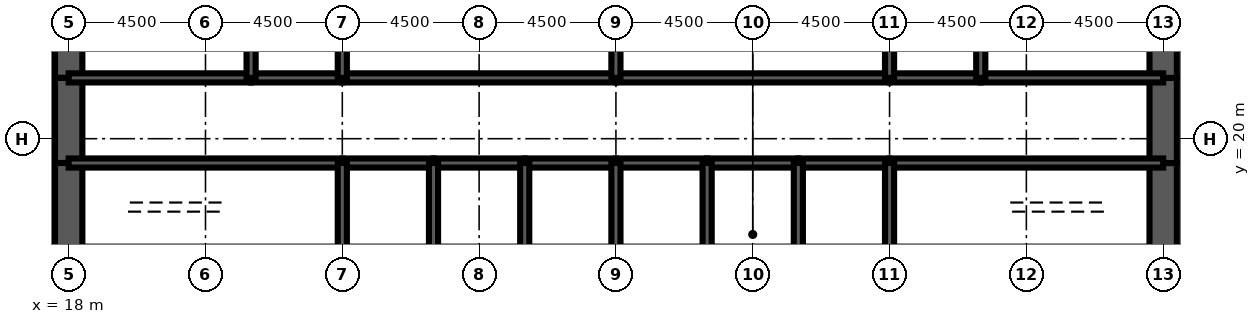
"""IFC4 building model, lengths in metres.
Left out: names, types, materials, properties, quantities, classifications, styles, units other than length and angle.
Written with IfcOpenShell. Run it as: python <this file> out.ifc"""

import sys

from ifc_helpers import new_model, si_unit, direction, frame, frame_2d, origin, place, context, subcontext, project, spatial, rectangle, extrude, element, fill, save


model = new_model("IFC4")
c1 = context("Model", 3, precision=1e-05, world=origin(), true_north=direction((0.0, 1.0)))
c2 = subcontext(c1, "Body", "Model", "MODEL_VIEW")
j1 = project(units=[si_unit("LENGTHUNIT", "METRE"), si_unit("PLANEANGLEUNIT", "RADIAN")], contexts=[c1])
p1 = place(None, origin())
s1 = spatial("IfcSite", under=j1, at=p1, CompositionType="ELEMENT")
p2 = place(p1, origin())
s2 = spatial("IfcBuilding", under=s1, at=p2, CompositionType="ELEMENT")
p3 = place(p2, frame((0.0, 0.0, 104.7)))
s3 = spatial("IfcBuildingStorey", under=s2, at=p3, CompositionType="ELEMENT", Elevation=104.7)
p4 = place(p3, frame((18.0, 26.0, 0.0), z_axis=(0.0, 0.0, 1.0), x_axis=(0.0, -1.0, 0.0)))
e1 = element("IfcWall", 1, at=p4, inside=s3, PredefinedType="SHEAR", context=c2, shape_type="SweptSolid", body=[
    extrude(rectangle(XDim=4.0, YDim=0.9, at=frame_2d((2.0, 0.0))), origin(), (0.0, 0.0, 1.0), 4.2),
])
p5 = place(p3, frame((18.0, 22.0, 0.0), z_axis=(0.0, 0.0, 1.0), x_axis=(0.0, -1.0, 0.0)))
e2 = element("IfcWall", 2, at=p5, inside=s3, PredefinedType="SHEAR", context=c2, shape_type="SweptSolid", body=[
    extrude(rectangle(XDim=2.8, YDim=0.9, at=frame_2d((1.4, 0.0))), origin(), (0.0, 0.0, 1.0), 4.2),
])
p6 = place(p5, frame((0.6, 0.0, 0.0)))
e3 = element("IfcOpeningElement", 3, at=p6, cuts=e2, PredefinedType="OPENING", context=c2, shape_type="SweptSolid", body=[
    extrude(rectangle(XDim=1.8, YDim=2.1, at=frame_2d((0.9, 1.05))), frame((0.0, 0.46, 0.0), z_axis=(0.0, -1.0, 0.0), x_axis=(1.0, 0.0, 0.0)), (0.0, 0.0, 1.0), 0.92),
])
for number, where, z_axis, x_axis in (
    (4, (18.0, 19.2, 0.0), (0.0, 0.0, 1.0), (0.0, -1.0, 0.0)),
    (5, (54.0, 16.0, 0.0), (0.0, 0.0, 1.0), (0.0, 1.0, 0.0)),
):
    element("IfcWall", number, at=place(p3, frame(where, z_axis=z_axis, x_axis=x_axis)), inside=s3, PredefinedType="SHEAR", context=c2, shape_type="SweptSolid", body=[
        extrude(rectangle(XDim=3.2, YDim=0.9, at=frame_2d((1.6, 0.0))), origin(), (0.0, 0.0, 1.0), 4.2),
    ])
p7 = place(p3, frame((54.0, 19.2, 0.0), z_axis=(0.0, 0.0, 1.0), x_axis=(0.0, 1.0, 0.0)))
e6 = element("IfcWall", 6, at=p7, inside=s3, PredefinedType="SHEAR", context=c2, shape_type="SweptSolid", body=[
    extrude(rectangle(XDim=2.8, YDim=0.9, at=frame_2d((1.4, 0.0))), origin(), (0.0, 0.0, 1.0), 4.2),
])
p8 = place(p7, frame((0.4, 0.0, 0.0)))
e7 = element("IfcOpeningElement", 7, at=p8, cuts=e6, PredefinedType="OPENING", context=c2, shape_type="SweptSolid", body=[
    extrude(rectangle(XDim=1.8, YDim=2.1, at=frame_2d((0.9, 1.05))), frame((0.0, 0.46, 0.0), z_axis=(0.0, -1.0, 0.0), x_axis=(1.0, 0.0, 0.0)), (0.0, 0.0, 1.0), 0.92),
])
p9 = place(p3, frame((54.0, 22.0, 0.0), z_axis=(0.0, 0.0, 1.0), x_axis=(0.0, 1.0, 0.0)))
e8 = element("IfcWall", 8, at=p9, inside=s3, PredefinedType="SHEAR", context=c2, shape_type="SweptSolid", body=[
    extrude(rectangle(XDim=4.0, YDim=0.9, at=frame_2d((2.0, 0.0))), origin(), (0.0, 0.0, 1.0), 4.2),
])
p10 = place(p3, frame((18.0, 19.2, 0.0), z_axis=(0.0, 0.0, 1.0), x_axis=(1.0, 0.0, 0.0)))
e9 = element("IfcWall", 9, at=p10, inside=s3, PredefinedType="SOLIDWALL", context=c2, shape_type="SweptSolid", body=[
    extrude(rectangle(XDim=9.0, YDim=0.3, at=frame_2d((4.5, 0.0))), origin(), (0.0, 0.0, 1.0), 4.2),
])
p11 = place(p10, frame((0.65, 0.0, 0.0)))
e10 = element("IfcOpeningElement", 10, at=p11, cuts=e9, PredefinedType="OPENING", context=c2, shape_type="SweptSolid", body=[
    extrude(rectangle(XDim=1.0, YDim=2.1, at=frame_2d((0.5, 1.05))), frame((0.0, 0.16, 0.0), z_axis=(0.0, -1.0, 0.0), x_axis=(1.0, 0.0, 0.0)), (0.0, 0.0, 1.0), 0.32),
])
p12 = place(p3, frame((27.0, 19.2, 0.0), z_axis=(0.0, 0.0, 1.0), x_axis=(1.0, 0.0, 0.0)))
e11 = element("IfcWall", 11, at=p12, inside=s3, PredefinedType="SOLIDWALL", context=c2, shape_type="SweptSolid", body=[
    extrude(rectangle(XDim=3.0, YDim=0.3, at=frame_2d((1.5, 0.0))), origin(), (0.0, 0.0, 1.0), 4.2),
])
p13 = place(p12, frame((0.95, 0.0, 0.0)))
e12 = element("IfcOpeningElement", 12, at=p13, cuts=e11, PredefinedType="OPENING", context=c2, shape_type="SweptSolid", body=[
    extrude(rectangle(XDim=1.1, YDim=2.2, at=frame_2d((0.55, 1.1))), frame((0.0, 0.16, 0.0), z_axis=(0.0, -1.0, 0.0), x_axis=(1.0, 0.0, 0.0)), (0.0, 0.0, 1.0), 0.32),
])
p14 = place(p3, frame((30.0, 19.2, 0.0), z_axis=(0.0, 0.0, 1.0), x_axis=(1.0, 0.0, 0.0)))
e13 = element("IfcWall", 13, at=p14, inside=s3, PredefinedType="SOLIDWALL", context=c2, shape_type="SweptSolid", body=[
    extrude(rectangle(XDim=3.0, YDim=0.3, at=frame_2d((1.5, 0.0))), origin(), (0.0, 0.0, 1.0), 4.2),
])
p15 = place(p14, frame((0.95, 0.0, 0.0)))
e14 = element("IfcOpeningElement", 14, at=p15, cuts=e13, PredefinedType="OPENING", context=c2, shape_type="SweptSolid", body=[
    extrude(rectangle(XDim=1.1, YDim=2.2, at=frame_2d((0.55, 1.1))), frame((0.0, 0.16, 0.0), z_axis=(0.0, -1.0, 0.0), x_axis=(1.0, 0.0, 0.0)), (0.0, 0.0, 1.0), 0.32),
])
p16 = place(p3, frame((33.0, 19.2, 0.0), z_axis=(0.0, 0.0, 1.0), x_axis=(1.0, 0.0, 0.0)))
e15 = element("IfcWall", 15, at=p16, inside=s3, PredefinedType="SOLIDWALL", context=c2, shape_type="SweptSolid", body=[
    extrude(rectangle(XDim=3.0, YDim=0.3, at=frame_2d((1.5, 0.0))), origin(), (0.0, 0.0, 1.0), 4.2),
])
p17 = place(p16, frame((0.95, 0.0, 0.0)))
e16 = element("IfcOpeningElement", 16, at=p17, cuts=e15, PredefinedType="OPENING", context=c2, shape_type="SweptSolid", body=[
    extrude(rectangle(XDim=1.1, YDim=2.2, at=frame_2d((0.55, 1.1))), frame((0.0, 0.16, 0.0), z_axis=(0.0, -1.0, 0.0), x_axis=(1.0, 0.0, 0.0)), (0.0, 0.0, 1.0), 0.32),
])
p18 = place(p3, frame((36.0, 19.2, 0.0), z_axis=(0.0, 0.0, 1.0), x_axis=(1.0, 0.0, 0.0)))
e17 = element("IfcWall", 17, at=p18, inside=s3, PredefinedType="SOLIDWALL", context=c2, shape_type="SweptSolid", body=[
    extrude(rectangle(XDim=3.0, YDim=0.3, at=frame_2d((1.5, 0.0))), origin(), (0.0, 0.0, 1.0), 4.2),
])
p19 = place(p18, frame((0.95, 0.0, 0.0)))
e18 = element("IfcOpeningElement", 18, at=p19, cuts=e17, PredefinedType="OPENING", context=c2, shape_type="SweptSolid", body=[
    extrude(rectangle(XDim=1.1, YDim=2.2, at=frame_2d((0.55, 1.1))), frame((0.0, 0.16, 0.0), z_axis=(0.0, -1.0, 0.0), x_axis=(1.0, 0.0, 0.0)), (0.0, 0.0, 1.0), 0.32),
])
p20 = place(p3, frame((39.0, 19.2, 0.0), z_axis=(0.0, 0.0, 1.0), x_axis=(1.0, 0.0, 0.0)))
e19 = element("IfcWall", 19, at=p20, inside=s3, PredefinedType="SOLIDWALL", context=c2, shape_type="SweptSolid", body=[
    extrude(rectangle(XDim=3.0, YDim=0.3, at=frame_2d((1.5, 0.0))), origin(), (0.0, 0.0, 1.0), 4.2),
])
p21 = place(p20, frame((1.0, 0.0, 0.0)))
e20 = element("IfcOpeningElement", 20, at=p21, cuts=e19, PredefinedType="OPENING", context=c2, shape_type="SweptSolid", body=[
    extrude(rectangle(XDim=1.0, YDim=2.1, at=frame_2d((0.5, 1.05))), frame((0.0, 0.16, 0.0), z_axis=(0.0, -1.0, 0.0), x_axis=(1.0, 0.0, 0.0)), (0.0, 0.0, 1.0), 0.32),
])
p22 = place(p3, frame((42.0, 19.2, 0.0), z_axis=(0.0, 0.0, 1.0), x_axis=(1.0, 0.0, 0.0)))
e21 = element("IfcWall", 21, at=p22, inside=s3, PredefinedType="SOLIDWALL", context=c2, shape_type="SweptSolid", body=[
    extrude(rectangle(XDim=3.0, YDim=0.3, at=frame_2d((1.5, 0.0))), origin(), (0.0, 0.0, 1.0), 4.2),
])
p23 = place(p3, frame((45.0, 19.2, 0.0), z_axis=(0.0, 0.0, 1.0), x_axis=(1.0, 0.0, 0.0)))
e22 = element("IfcWall", 22, at=p23, inside=s3, PredefinedType="SOLIDWALL", context=c2, shape_type="SweptSolid", body=[
    extrude(rectangle(XDim=9.0, YDim=0.3, at=frame_2d((4.5, 0.0))), origin(), (0.0, 0.0, 1.0), 4.2),
])
p24 = place(p23, frame((7.35, 0.0, 0.0)))
e23 = element("IfcOpeningElement", 23, at=p24, cuts=e22, PredefinedType="OPENING", context=c2, shape_type="SweptSolid", body=[
    extrude(rectangle(XDim=1.0, YDim=2.1, at=frame_2d((0.5, 1.05))), frame((0.0, 0.16, 0.0), z_axis=(0.0, -1.0, 0.0), x_axis=(1.0, 0.0, 0.0)), (0.0, 0.0, 1.0), 0.32),
])
p25 = place(p3, frame((18.0, 22.0, 0.0), z_axis=(0.0, 0.0, 1.0), x_axis=(1.0, 0.0, 0.0)))
e24 = element("IfcWall", 24, at=p25, inside=s3, PredefinedType="SOLIDWALL", context=c2, shape_type="SweptSolid", body=[
    extrude(rectangle(XDim=6.0, YDim=0.3, at=frame_2d((3.0, 0.0))), origin(), (0.0, 0.0, 1.0), 4.2),
])
p26 = place(p25, frame((4.4, 0.0, 0.0)))
e25 = element("IfcOpeningElement", 25, at=p26, cuts=e24, PredefinedType="OPENING", context=c2, shape_type="SweptSolid", body=[
    extrude(rectangle(XDim=1.0, YDim=2.1, at=frame_2d((0.5, 1.05))), frame((0.0, 0.16, 0.0), z_axis=(0.0, -1.0, 0.0), x_axis=(1.0, 0.0, 0.0)), (0.0, 0.0, 1.0), 0.32),
])
p27 = place(p25, frame((0.7, 0.0, 0.0)))
e26 = element("IfcOpeningElement", 26, at=p27, cuts=e24, PredefinedType="OPENING", context=c2, shape_type="SweptSolid", body=[
    extrude(rectangle(XDim=1.0, YDim=2.1, at=frame_2d((0.5, 1.05))), frame((0.0, 0.16, 0.0), z_axis=(0.0, -1.0, 0.0), x_axis=(1.0, 0.0, 0.0)), (0.0, 0.0, 1.0), 0.32),
])
p28 = place(p3, frame((24.0, 22.0, 0.0), z_axis=(0.0, 0.0, 1.0), x_axis=(1.0, 0.0, 0.0)))
e27 = element("IfcWall", 27, at=p28, inside=s3, PredefinedType="SOLIDWALL", context=c2, shape_type="SweptSolid", body=[
    extrude(rectangle(XDim=3.0, YDim=0.3, at=frame_2d((1.5, 0.0))), origin(), (0.0, 0.0, 1.0), 4.2),
])
p29 = place(p28, frame((1.0, 0.0, 0.0)))
e28 = element("IfcOpeningElement", 28, at=p29, cuts=e27, PredefinedType="OPENING", context=c2, shape_type="SweptSolid", body=[
    extrude(rectangle(XDim=1.0, YDim=2.1, at=frame_2d((0.5, 1.05))), frame((0.0, 0.16, 0.0), z_axis=(0.0, -1.0, 0.0), x_axis=(1.0, 0.0, 0.0)), (0.0, 0.0, 1.0), 0.32),
])
p30 = place(p3, frame((27.0, 22.0, 0.0), z_axis=(0.0, 0.0, 1.0), x_axis=(1.0, 0.0, 0.0)))
e29 = element("IfcWall", 29, at=p30, inside=s3, PredefinedType="SOLIDWALL", context=c2, shape_type="SweptSolid", body=[
    extrude(rectangle(XDim=9.0, YDim=0.3, at=frame_2d((4.5, 0.0))), origin(), (0.0, 0.0, 1.0), 4.2),
])
p31 = place(p30, frame((4.0, 0.0, 0.0)))
e30 = element("IfcOpeningElement", 30, at=p31, cuts=e29, PredefinedType="OPENING", context=c2, shape_type="SweptSolid", body=[
    extrude(rectangle(XDim=1.0, YDim=2.1, at=frame_2d((0.5, 1.05))), frame((0.0, 0.16, 0.0), z_axis=(0.0, -1.0, 0.0), x_axis=(1.0, 0.0, 0.0)), (0.0, 0.0, 1.0), 0.32),
])
p32 = place(p3, frame((36.0, 22.0, 0.0), z_axis=(0.0, 0.0, 1.0), x_axis=(1.0, 0.0, 0.0)))
e31 = element("IfcWall", 31, at=p32, inside=s3, PredefinedType="SOLIDWALL", context=c2, shape_type="SweptSolid", body=[
    extrude(rectangle(XDim=9.0, YDim=0.3, at=frame_2d((4.5, 0.0))), origin(), (0.0, 0.0, 1.0), 4.2),
])
p33 = place(p32, frame((4.0, 0.0, 0.0)))
e32 = element("IfcOpeningElement", 32, at=p33, cuts=e31, PredefinedType="OPENING", context=c2, shape_type="SweptSolid", body=[
    extrude(rectangle(XDim=1.0, YDim=2.1, at=frame_2d((0.5, 1.05))), frame((0.0, 0.16, 0.0), z_axis=(0.0, -1.0, 0.0), x_axis=(1.0, 0.0, 0.0)), (0.0, 0.0, 1.0), 0.32),
])
p34 = place(p3, frame((45.0, 22.0, 0.0), z_axis=(0.0, 0.0, 1.0), x_axis=(1.0, 0.0, 0.0)))
e33 = element("IfcWall", 33, at=p34, inside=s3, PredefinedType="SOLIDWALL", context=c2, shape_type="SweptSolid", body=[
    extrude(rectangle(XDim=3.0, YDim=0.3, at=frame_2d((1.5, 0.0))), origin(), (0.0, 0.0, 1.0), 4.2),
])
p35 = place(p34, frame((1.0, 0.0, 0.0)))
e34 = element("IfcOpeningElement", 34, at=p35, cuts=e33, PredefinedType="OPENING", context=c2, shape_type="SweptSolid", body=[
    extrude(rectangle(XDim=1.0, YDim=2.1, at=frame_2d((0.5, 1.05))), frame((0.0, 0.16, 0.0), z_axis=(0.0, -1.0, 0.0), x_axis=(1.0, 0.0, 0.0)), (0.0, 0.0, 1.0), 0.32),
])
p36 = place(p3, frame((48.0, 22.0, 0.0), z_axis=(0.0, 0.0, 1.0), x_axis=(1.0, 0.0, 0.0)))
e35 = element("IfcWall", 35, at=p36, inside=s3, PredefinedType="SOLIDWALL", context=c2, shape_type="SweptSolid", body=[
    extrude(rectangle(XDim=6.0, YDim=0.3, at=frame_2d((3.0, 0.0))), origin(), (0.0, 0.0, 1.0), 4.2),
])
p37 = place(p36, frame((2.0, 0.0, 0.0)))
e36 = element("IfcOpeningElement", 36, at=p37, cuts=e35, PredefinedType="OPENING", context=c2, shape_type="SweptSolid", body=[
    extrude(rectangle(XDim=1.0, YDim=2.1, at=frame_2d((0.5, 1.05))), frame((0.0, 0.16, 0.0), z_axis=(0.0, -1.0, 0.0), x_axis=(1.0, 0.0, 0.0)), (0.0, 0.0, 1.0), 0.32),
])
p38 = place(p36, frame((4.3, 0.0, 0.0)))
e37 = element("IfcOpeningElement", 37, at=p38, cuts=e35, PredefinedType="OPENING", context=c2, shape_type="SweptSolid", body=[
    extrude(rectangle(XDim=1.0, YDim=2.1, at=frame_2d((0.5, 1.05))), frame((0.0, 0.16, 0.0), z_axis=(0.0, -1.0, 0.0), x_axis=(1.0, 0.0, 0.0)), (0.0, 0.0, 1.0), 0.32),
])
for number, where, z_axis, x_axis in (
    (38, (27.0, 16.0, 0.0), (0.0, 0.0, 1.0), (0.0, 1.0, 0.0)),
    (39, (30.0, 16.0, 0.0), (0.0, 0.0, 1.0), (0.0, 1.0, 0.0)),
    (40, (33.0, 16.0, 0.0), (0.0, 0.0, 1.0), (0.0, 1.0, 0.0)),
    (41, (36.0, 16.0, 0.0), (0.0, 0.0, 1.0), (0.0, 1.0, 0.0)),
    (42, (39.0, 16.0, 0.0), (0.0, 0.0, 1.0), (0.0, 1.0, 0.0)),
    (43, (42.0, 16.0, 0.0), (0.0, 0.0, 1.0), (0.0, 1.0, 0.0)),
    (44, (45.0, 16.0, 0.0), (0.0, 0.0, 1.0), (0.0, 1.0, 0.0)),
):
    element("IfcWall", number, at=place(p3, frame(where, z_axis=z_axis, x_axis=x_axis)), inside=s3, PredefinedType="SOLIDWALL", context=c2, shape_type="SweptSolid", body=[
        extrude(rectangle(XDim=3.2, YDim=0.3, at=frame_2d((1.6, 0.0))), origin(), (0.0, 0.0, 1.0), 4.2),
    ])
for number, where, z_axis, x_axis in (
    (45, (24.0, 22.0, 0.0), (0.0, 0.0, 1.0), (0.0, 1.0, 0.0)),
    (46, (27.0, 22.0, 0.0), (0.0, 0.0, 1.0), (0.0, 1.0, 0.0)),
    (47, (36.0, 22.0, 0.0), (0.0, 0.0, 1.0), (0.0, 1.0, 0.0)),
    (48, (45.0, 22.0, 0.0), (0.0, 0.0, 1.0), (0.0, 1.0, 0.0)),
    (49, (48.0, 22.0, 0.0), (0.0, 0.0, 1.0), (0.0, 1.0, 0.0)),
):
    element("IfcWall", number, at=place(p3, frame(where, z_axis=z_axis, x_axis=x_axis)), inside=s3, PredefinedType="SOLIDWALL", context=c2, shape_type="SweptSolid", body=[
        extrude(rectangle(XDim=4.0, YDim=0.3, at=frame_2d((2.0, 0.0))), origin(), (0.0, 0.0, 1.0), 4.2),
    ])
p39 = place(p3, frame((39.15, 17.4, 0.0), z_axis=(0.0, 0.0, 1.0), x_axis=(1.0, 0.0, 0.0)))
e50 = element("IfcWall", 50, at=p39, inside=s3, PredefinedType="SOLIDWALL", context=c2, shape_type="SweptSolid", body=[
    extrude(rectangle(XDim=2.7, YDim=0.3, at=frame_2d((1.35, 0.0))), origin(), (0.0, 0.0, 1.0), 4.04),
])
p40 = place(p39, frame((0.85, 0.0, 0.0)))
e51 = element("IfcOpeningElement", 51, at=p40, cuts=e50, PredefinedType="OPENING", context=c2, shape_type="SweptSolid", body=[
    extrude(rectangle(XDim=1.0, YDim=2.1, at=frame_2d((0.5, 1.05))), frame((0.0, 0.16, 0.0), z_axis=(0.0, -1.0, 0.0), x_axis=(1.0, 0.0, 0.0)), (0.0, 0.0, 1.0), 0.32),
])
p41 = place(p3, frame((38.0, 22.15, 0.0), z_axis=(0.0, 0.0, 1.0), x_axis=(0.0, 1.0, 0.0)))
e52 = element("IfcWall", 52, at=p41, inside=s3, PredefinedType="PARTITIONING", context=c2, shape_type="SweptSolid", body=[
    extrude(rectangle(XDim=3.7, YDim=0.15, at=frame_2d((1.85, 0.0))), origin(), (0.0, 0.0, 1.0), 3.0),
])
p42 = place(p41, frame((2.2, 0.0, 0.0)))
e53 = element("IfcOpeningElement", 53, at=p42, cuts=e52, PredefinedType="OPENING", context=c2, shape_type="SweptSolid", body=[
    extrude(rectangle(XDim=1.0, YDim=2.1, at=frame_2d((0.5, 1.05))), frame((0.0, 0.085, 0.0), z_axis=(0.0, -1.0, 0.0), x_axis=(1.0, 0.0, 0.0)), (0.0, 0.0, 1.0), 0.17),
])
for number, where, z_axis, x_axis in (
    (54, (20.025, 22.15, 0.0), (0.0, 0.0, 1.0), (0.0, 1.0, 0.0)),
    (55, (51.975, 22.15, 0.0), (0.0, 0.0, 1.0), (0.0, 1.0, 0.0)),
):
    element("IfcWall", number, at=place(p3, frame(where, z_axis=z_axis, x_axis=x_axis)), inside=s3, PredefinedType="PARTITIONING", context=c2, shape_type="SweptSolid", body=[
        extrude(rectangle(XDim=3.7, YDim=0.15, at=frame_2d((1.85, 0.0))), origin(), (0.0, 0.0, 1.0), 3.0),
    ])
p43 = place(p40, origin())
e56 = element("IfcDoor", 56, at=p43, inside=s3, OperationType="SINGLE_SWING_LEFT", PredefinedType="DOOR", context=c2, shape_type="SweptSolid", body=[
    extrude(rectangle(XDim=1.0, YDim=2.1, at=frame_2d((0.5, 1.05))), frame((0.0, 0.025, 0.0), z_axis=(0.0, -1.0, 0.0), x_axis=(1.0, 0.0, 0.0)), (0.0, 0.0, 1.0), 0.05),
])
fill(e51, e56)
p44 = place(p13, origin())
e57 = element("IfcDoor", 57, at=p44, inside=s3, OperationType="DOUBLE_DOOR_SLIDING", PredefinedType="USERDEFINED", context=c2, shape_type="SweptSolid", body=[
    extrude(rectangle(XDim=1.1, YDim=2.2, at=frame_2d((0.55, 1.1))), frame((0.0, 0.025, 0.0), z_axis=(0.0, -1.0, 0.0), x_axis=(1.0, 0.0, 0.0)), (0.0, 0.0, 1.0), 0.05),
])
fill(e12, e57)
p45 = place(p15, origin())
e58 = element("IfcDoor", 58, at=p45, inside=s3, OperationType="DOUBLE_DOOR_SLIDING", PredefinedType="USERDEFINED", context=c2, shape_type="SweptSolid", body=[
    extrude(rectangle(XDim=1.1, YDim=2.2, at=frame_2d((0.55, 1.1))), frame((0.0, 0.025, 0.0), z_axis=(0.0, -1.0, 0.0), x_axis=(1.0, 0.0, 0.0)), (0.0, 0.0, 1.0), 0.05),
])
fill(e14, e58)
p46 = place(p17, origin())
e59 = element("IfcDoor", 59, at=p46, inside=s3, OperationType="DOUBLE_DOOR_SLIDING", PredefinedType="USERDEFINED", context=c2, shape_type="SweptSolid", body=[
    extrude(rectangle(XDim=1.1, YDim=2.2, at=frame_2d((0.55, 1.1))), frame((0.0, 0.025, 0.0), z_axis=(0.0, -1.0, 0.0), x_axis=(1.0, 0.0, 0.0)), (0.0, 0.0, 1.0), 0.05),
])
fill(e16, e59)
p47 = place(p19, origin())
e60 = element("IfcDoor", 60, at=p47, inside=s3, OperationType="DOUBLE_DOOR_SLIDING", PredefinedType="USERDEFINED", context=c2, shape_type="SweptSolid", body=[
    extrude(rectangle(XDim=1.1, YDim=2.2, at=frame_2d((0.55, 1.1))), frame((0.0, 0.025, 0.0), z_axis=(0.0, -1.0, 0.0), x_axis=(1.0, 0.0, 0.0)), (0.0, 0.0, 1.0), 0.05),
])
fill(e18, e60)
p48 = place(p11, origin())
e61 = element("IfcDoor", 61, at=p48, inside=s3, OperationType="SINGLE_SWING_LEFT", PredefinedType="DOOR", context=c2, shape_type="SweptSolid", body=[
    extrude(rectangle(XDim=1.0, YDim=2.1, at=frame_2d((0.5, 1.05))), frame((0.0, 0.025, 0.0), z_axis=(0.0, -1.0, 0.0), x_axis=(1.0, 0.0, 0.0)), (0.0, 0.0, 1.0), 0.05),
])
fill(e10, e61)
p49 = place(p24, origin())
e62 = element("IfcDoor", 62, at=p49, inside=s3, OperationType="SINGLE_SWING_RIGHT", PredefinedType="DOOR", context=c2, shape_type="SweptSolid", body=[
    extrude(rectangle(XDim=1.0, YDim=2.1, at=frame_2d((0.5, 1.05))), frame((0.0, 0.025, 0.0), z_axis=(0.0, -1.0, 0.0), x_axis=(1.0, 0.0, 0.0)), (0.0, 0.0, 1.0), 0.05),
])
fill(e23, e62)
p50 = place(p6, origin())
e63 = element("IfcDoor", 63, at=p50, inside=s3, OperationType="SINGLE_SWING_LEFT", PredefinedType="DOOR", context=c2, shape_type="SweptSolid", body=[
    extrude(rectangle(XDim=1.8, YDim=2.1, at=frame_2d((0.9, 1.05))), frame((0.0, 0.45, 0.0), z_axis=(0.0, -1.0, 0.0), x_axis=(1.0, 0.0, 0.0)), (0.0, 0.0, 1.0), 0.899),
])
fill(e3, e63)
p51 = place(p8, origin())
e64 = element("IfcDoor", 64, at=p51, inside=s3, OperationType="SINGLE_SWING_LEFT", PredefinedType="DOOR", context=c2, shape_type="SweptSolid", body=[
    extrude(rectangle(XDim=1.8, YDim=2.1, at=frame_2d((0.9, 1.05))), frame((0.0, 0.45, 0.0), z_axis=(0.0, -1.0, 0.0), x_axis=(1.0, 0.0, 0.0)), (0.0, 0.0, 1.0), 0.899),
])
fill(e7, e64)
p52 = place(p26, origin())
e65 = element("IfcDoor", 65, at=p52, inside=s3, OperationType="SINGLE_SWING_RIGHT", PredefinedType="DOOR", context=c2, shape_type="SweptSolid", body=[
    extrude(rectangle(XDim=1.0, YDim=2.1, at=frame_2d((0.5, 1.05))), frame((0.0, 0.025, 0.0), z_axis=(0.0, -1.0, 0.0), x_axis=(1.0, 0.0, 0.0)), (0.0, 0.0, 1.0), 0.05),
])
fill(e25, e65)
p53 = place(p29, origin())
e66 = element("IfcDoor", 66, at=p53, inside=s3, OperationType="SINGLE_SWING_LEFT", PredefinedType="DOOR", context=c2, shape_type="SweptSolid", body=[
    extrude(rectangle(XDim=1.0, YDim=2.1, at=frame_2d((0.5, 1.05))), frame((0.0, 0.025, 0.0), z_axis=(0.0, -1.0, 0.0), x_axis=(1.0, 0.0, 0.0)), (0.0, 0.0, 1.0), 0.05),
])
fill(e28, e66)
p54 = place(p31, origin())
e67 = element("IfcDoor", 67, at=p54, inside=s3, OperationType="SINGLE_SWING_LEFT", PredefinedType="DOOR", context=c2, shape_type="SweptSolid", body=[
    extrude(rectangle(XDim=1.0, YDim=2.1, at=frame_2d((0.5, 1.05))), frame((0.0, 0.025, 0.0), z_axis=(0.0, -1.0, 0.0), x_axis=(1.0, 0.0, 0.0)), (0.0, 0.0, 1.0), 0.05),
])
fill(e30, e67)
p55 = place(p33, origin())
e68 = element("IfcDoor", 68, at=p55, inside=s3, OperationType="SINGLE_SWING_LEFT", PredefinedType="DOOR", context=c2, shape_type="SweptSolid", body=[
    extrude(rectangle(XDim=1.0, YDim=2.1, at=frame_2d((0.5, 1.05))), frame((0.0, 0.025, 0.0), z_axis=(0.0, -1.0, 0.0), x_axis=(1.0, 0.0, 0.0)), (0.0, 0.0, 1.0), 0.05),
])
fill(e32, e68)
p56 = place(p35, origin())
e69 = element("IfcDoor", 69, at=p56, inside=s3, OperationType="SINGLE_SWING_LEFT", PredefinedType="DOOR", context=c2, shape_type="SweptSolid", body=[
    extrude(rectangle(XDim=1.0, YDim=2.1, at=frame_2d((0.5, 1.05))), frame((0.0, 0.025, 0.0), z_axis=(0.0, -1.0, 0.0), x_axis=(1.0, 0.0, 0.0)), (0.0, 0.0, 1.0), 0.05),
])
fill(e34, e69)
p57 = place(p37, origin())
e70 = element("IfcDoor", 70, at=p57, inside=s3, OperationType="SINGLE_SWING_LEFT", PredefinedType="DOOR", context=c2, shape_type="SweptSolid", body=[
    extrude(rectangle(XDim=1.0, YDim=2.1, at=frame_2d((0.5, 1.05))), frame((0.0, 0.025, 0.0), z_axis=(0.0, -1.0, 0.0), x_axis=(1.0, 0.0, 0.0)), (0.0, 0.0, 1.0), 0.05),
])
fill(e36, e70)
p58 = place(p27, origin())
e71 = element("IfcDoor", 71, at=p58, inside=s3, OperationType="SINGLE_SWING_LEFT", PredefinedType="DOOR", context=c2, shape_type="SweptSolid", body=[
    extrude(rectangle(XDim=1.0, YDim=2.1, at=frame_2d((0.5, 1.05))), frame((0.0, 0.025, 0.0), z_axis=(0.0, -1.0, 0.0), x_axis=(1.0, 0.0, 0.0)), (0.0, 0.0, 1.0), 0.05),
])
fill(e26, e71)
p59 = place(p38, origin())
e72 = element("IfcDoor", 72, at=p59, inside=s3, OperationType="SINGLE_SWING_RIGHT", PredefinedType="DOOR", context=c2, shape_type="SweptSolid", body=[
    extrude(rectangle(XDim=1.0, YDim=2.1, at=frame_2d((0.5, 1.05))), frame((0.0, 0.025, 0.0), z_axis=(0.0, -1.0, 0.0), x_axis=(1.0, 0.0, 0.0)), (0.0, 0.0, 1.0), 0.05),
])
fill(e37, e72)
p60 = place(p21, origin())
e73 = element("IfcDoor", 73, at=p60, inside=s3, OperationType="SINGLE_SWING_LEFT", PredefinedType="DOOR", context=c2, shape_type="SweptSolid", body=[
    extrude(rectangle(XDim=1.0, YDim=2.1, at=frame_2d((0.5, 1.05))), frame((0.0, 0.025, 0.0), z_axis=(0.0, -1.0, 0.0), x_axis=(1.0, 0.0, 0.0)), (0.0, 0.0, 1.0), 0.05),
])
fill(e20, e73)
save(model, sys.argv[1])
